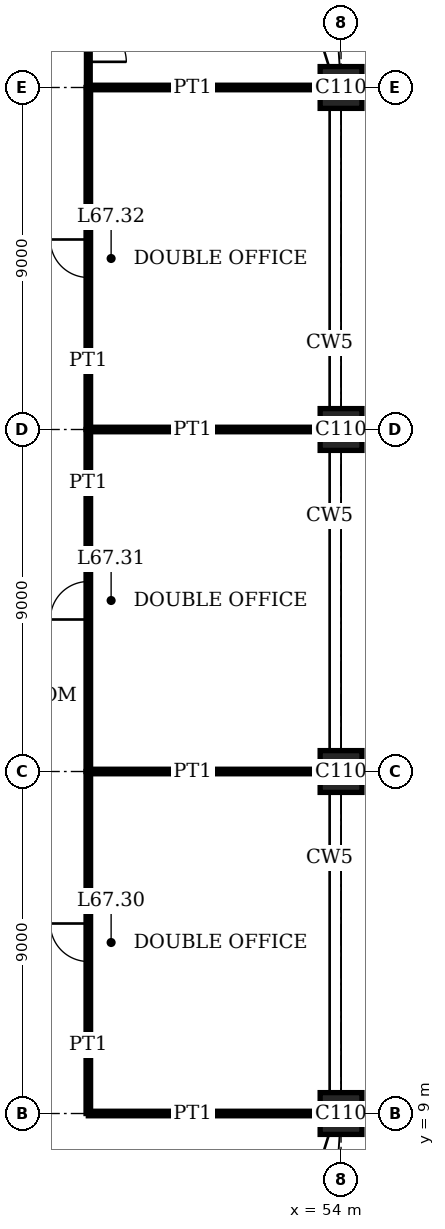
"""IFC4 building model, lengths in metres.
Left out: names, types, materials, properties, quantities, classifications, styles, units other than length and angle.
Written with IfcOpenShell. Run it as: python <this file> out.ifc"""

import sys

from ifc_helpers import new_model, si_unit, direction, frame, frame_2d, origin, origin_2d, place, context, subcontext, project, spatial, rectangle, extrude, element, fill, save


model = new_model("IFC4")
c1 = context("Model", 3, precision=1e-05, world=origin(), true_north=direction((0.0, 1.0)))
c2 = subcontext(c1, "Body", "Model", "MODEL_VIEW")
j1 = project(units=[si_unit("LENGTHUNIT", "METRE"), si_unit("PLANEANGLEUNIT", "RADIAN")], contexts=[c1])
p1 = place(None, origin())
s1 = spatial("IfcSite", under=j1, at=p1, CompositionType="ELEMENT")
p2 = place(p1, origin())
s2 = spatial("IfcBuilding", under=s1, at=p2, CompositionType="ELEMENT")
p3 = place(p2, frame((0.0, 0.0, 275.4)))
s3 = spatial("IfcBuildingStorey", under=s2, at=p3, CompositionType="ELEMENT", Elevation=275.4)
for number, where, z_axis, x_axis in (
    (1, (54.0, 9.0, 0.0), (0.0, 0.0, 1.0), (1.0, 0.0, 0.0)),
    (2, (54.0, 18.0, 0.0), (0.0, 0.0, 1.0), (1.0, 0.0, 0.0)),
    (3, (54.0, 27.0, 0.0), (0.0, 0.0, 1.0), (1.0, 0.0, 0.0)),
    (4, (54.0, 36.0, 0.0), (0.0, 0.0, 1.0), (1.0, 0.0, 0.0)),
):
    element("IfcColumn", number, at=place(p3, frame(where, z_axis=z_axis, x_axis=x_axis)), inside=s3, PredefinedType="COLUMN", context=c2, shape_type="SweptSolid", body=[
        extrude(rectangle(XDim=1.1, YDim=1.1, at=origin_2d()), origin(), (0.0, 0.0, 1.0), 4.0),
    ])
for number, where, z_axis, x_axis in (
    (5, (47.35, 9.0, 0.0), (0.0, 0.0, 1.0), (1.0, 0.0, 0.0)),
    (6, (47.35, 18.0, 0.0), (0.0, 0.0, 1.0), (1.0, 0.0, 0.0)),
    (7, (47.35, 27.0, 0.0), (0.0, 0.0, 1.0), (1.0, 0.0, 0.0)),
    (8, (47.35, 36.0, 0.0), (0.0, 0.0, 1.0), (1.0, 0.0, 0.0)),
):
    element("IfcWall", number, at=place(p3, frame(where, z_axis=z_axis, x_axis=x_axis)), inside=s3, PredefinedType="PARTITIONING", context=c2, shape_type="SweptSolid", body=[
        extrude(rectangle(XDim=6.1, YDim=0.12, at=frame_2d((3.05, 0.0))), origin(), (0.0, 0.0, 1.0), 3.05),
    ])
p4 = place(p3, frame((47.35, 9.0, 0.0), z_axis=(0.0, 0.0, 1.0), x_axis=(0.0, 1.0, 0.0)))
e9 = element("IfcWall", 9, at=p4, inside=s3, PredefinedType="PARTITIONING", context=c2, shape_type="SweptSolid", body=[
    extrude(rectangle(XDim=9.0, YDim=0.12, at=frame_2d((4.5, 0.0))), origin(), (0.0, 0.0, 1.0), 3.75),
])
p5 = place(p4, frame((4.0, 0.0, 0.0)))
e10 = element("IfcOpeningElement", 10, at=p5, cuts=e9, PredefinedType="OPENING", context=c2, shape_type="SweptSolid", body=[
    extrude(rectangle(XDim=1.0, YDim=2.4, at=frame_2d((0.5, 1.2))), frame((0.0, 0.07, 0.0), z_axis=(0.0, -1.0, 0.0), x_axis=(1.0, 0.0, 0.0)), (0.0, 0.0, 1.0), 0.14),
])
p6 = place(p3, frame((47.35, 18.0, 0.0), z_axis=(0.0, 0.0, 1.0), x_axis=(0.0, 1.0, 0.0)))
e11 = element("IfcWall", 11, at=p6, inside=s3, PredefinedType="PARTITIONING", context=c2, shape_type="SweptSolid", body=[
    extrude(rectangle(XDim=9.0, YDim=0.12, at=frame_2d((4.5, 0.0))), origin(), (0.0, 0.0, 1.0), 3.75),
])
p7 = place(p6, frame((4.0, 0.0, 0.0)))
e12 = element("IfcOpeningElement", 12, at=p7, cuts=e11, PredefinedType="OPENING", context=c2, shape_type="SweptSolid", body=[
    extrude(rectangle(XDim=1.0, YDim=2.4, at=frame_2d((0.5, 1.2))), frame((0.0, 0.07, 0.0), z_axis=(0.0, -1.0, 0.0), x_axis=(1.0, 0.0, 0.0)), (0.0, 0.0, 1.0), 0.14),
])
p8 = place(p3, frame((47.35, 27.0, 0.0), z_axis=(0.0, 0.0, 1.0), x_axis=(0.0, 1.0, 0.0)))
e13 = element("IfcWall", 13, at=p8, inside=s3, PredefinedType="PARTITIONING", context=c2, shape_type="SweptSolid", body=[
    extrude(rectangle(XDim=9.0, YDim=0.12, at=frame_2d((4.5, 0.0))), origin(), (0.0, 0.0, 1.0), 3.75),
])
p9 = place(p8, frame((4.0, 0.0, 0.0)))
e14 = element("IfcOpeningElement", 14, at=p9, cuts=e13, PredefinedType="OPENING", context=c2, shape_type="SweptSolid", body=[
    extrude(rectangle(XDim=1.0, YDim=2.4, at=frame_2d((0.5, 1.2))), frame((0.0, 0.07, 0.0), z_axis=(0.0, -1.0, 0.0), x_axis=(1.0, 0.0, 0.0)), (0.0, 0.0, 1.0), 0.14),
])
p10 = place(p3, frame((47.35, 36.0, 0.0), z_axis=(0.0, 0.0, 1.0), x_axis=(0.0, 1.0, 0.0)))
e15 = element("IfcWall", 15, at=p10, inside=s3, PredefinedType="PARTITIONING", context=c2, shape_type="SweptSolid", body=[
    extrude(rectangle(XDim=2.35, YDim=0.1, at=frame_2d((1.175, 0.0))), origin(), (0.0, 0.0, 1.0), 3.75),
])
p11 = place(p10, frame((0.675, 0.0, 0.0)))
e16 = element("IfcOpeningElement", 16, at=p11, cuts=e15, PredefinedType="OPENING", context=c2, shape_type="SweptSolid", body=[
    extrude(rectangle(XDim=1.0, YDim=2.4, at=frame_2d((0.5, 1.2))), frame((0.0, 0.06, 0.0), z_axis=(0.0, -1.0, 0.0), x_axis=(1.0, 0.0, 0.0)), (0.0, 0.0, 1.0), 0.12),
])
p12 = place(p5, origin())
e17 = element("IfcDoor", 17, at=p12, inside=s3, OperationType="SINGLE_SWING_LEFT", PredefinedType="DOOR", context=c2, shape_type="SweptSolid", body=[
    extrude(rectangle(XDim=1.0, YDim=2.4, at=frame_2d((0.5, 1.2))), frame((0.0, 0.025, 0.0), z_axis=(0.0, -1.0, 0.0), x_axis=(1.0, 0.0, 0.0)), (0.0, 0.0, 1.0), 0.05),
])
fill(e10, e17)
p13 = place(p7, origin())
e18 = element("IfcDoor", 18, at=p13, inside=s3, OperationType="SINGLE_SWING_RIGHT", PredefinedType="DOOR", context=c2, shape_type="SweptSolid", body=[
    extrude(rectangle(XDim=1.0, YDim=2.4, at=frame_2d((0.5, 1.2))), frame((0.0, 0.025, 0.0), z_axis=(0.0, -1.0, 0.0), x_axis=(1.0, 0.0, 0.0)), (0.0, 0.0, 1.0), 0.05),
])
fill(e12, e18)
p14 = place(p9, origin())
e19 = element("IfcDoor", 19, at=p14, inside=s3, OperationType="SINGLE_SWING_LEFT", PredefinedType="DOOR", context=c2, shape_type="SweptSolid", body=[
    extrude(rectangle(XDim=1.0, YDim=2.4, at=frame_2d((0.5, 1.2))), frame((0.0, 0.025, 0.0), z_axis=(0.0, -1.0, 0.0), x_axis=(1.0, 0.0, 0.0)), (0.0, 0.0, 1.0), 0.05),
])
fill(e14, e19)
p15 = place(p11, origin())
e20 = element("IfcDoor", 20, at=p15, inside=s3, OperationType="SINGLE_SWING_LEFT", PredefinedType="DOOR", context=c2, shape_type="SweptSolid", body=[
    extrude(rectangle(XDim=1.0, YDim=2.4, at=frame_2d((0.5, 1.2))), frame((0.0, 0.02, 0.0), z_axis=(0.0, -1.0, 0.0), x_axis=(1.0, 0.0, 0.0)), (0.0, 0.0, 1.0), 0.04),
])
fill(e16, e20)
save(model, sys.argv[1])
